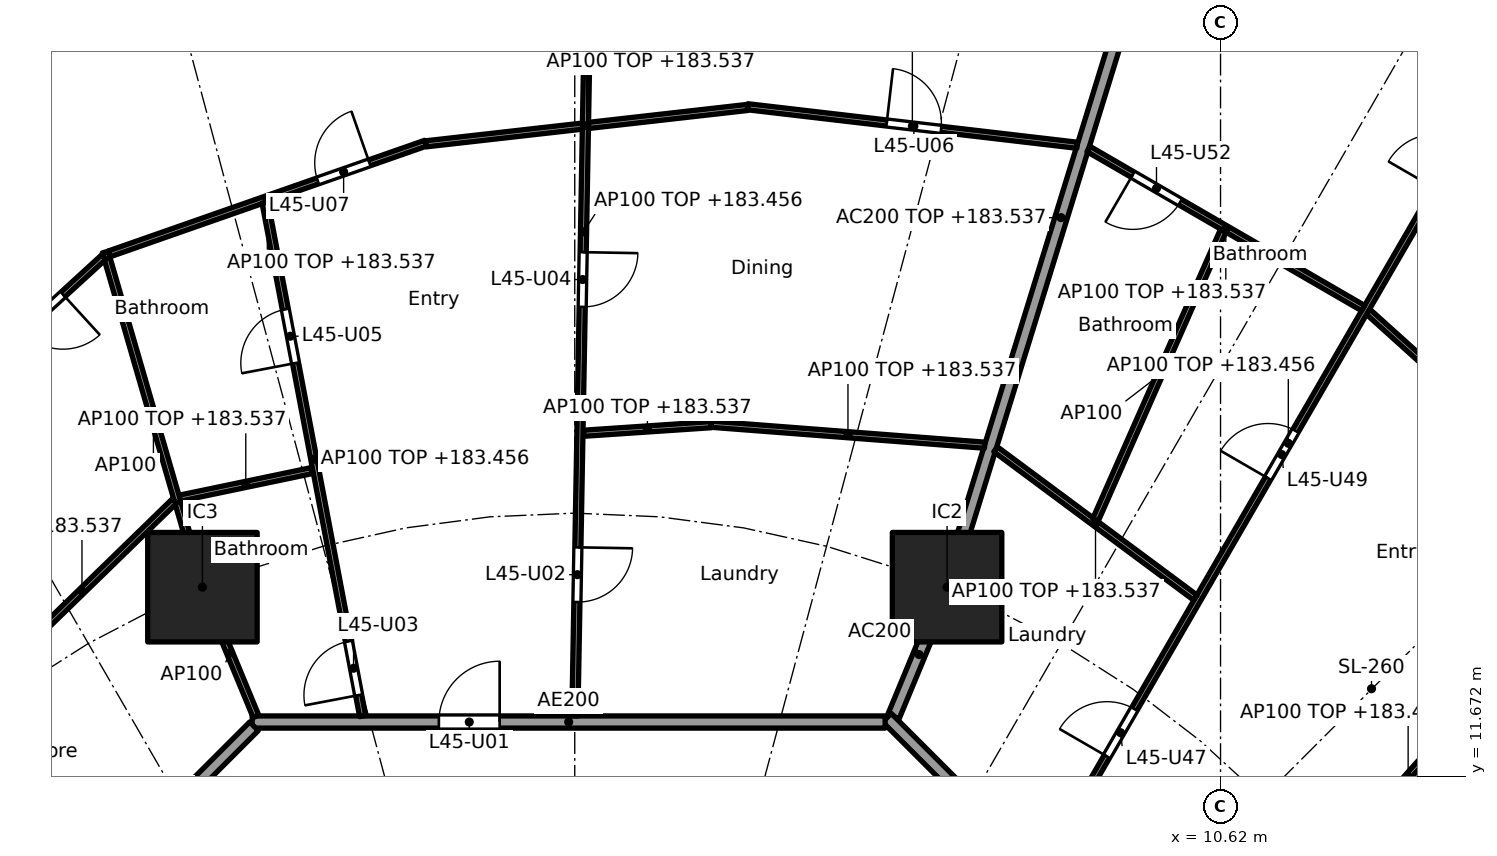
"""IFC4 building model, lengths in metres.
Left out: names, types, materials, properties, quantities, classifications, styles, units other than length and angle.
Written with IfcOpenShell. Run it as: python <this file> out.ifc"""

import sys

from ifc_helpers import new_model, si_unit, direction, frame, frame_2d, origin, origin_2d, place, context, subcontext, project, spatial, rectangle, extrude, element, fill, save


model = new_model("IFC4")
c1 = context("Model", 3, precision=1e-05, world=origin(), true_north=direction((0.0, 1.0)))
c2 = subcontext(c1, "Body", "Model", "MODEL_VIEW")
j1 = project(units=[si_unit("LENGTHUNIT", "METRE"), si_unit("PLANEANGLEUNIT", "RADIAN")], contexts=[c1])
p1 = place(None, origin())
s1 = spatial("IfcSite", under=j1, at=p1, CompositionType="ELEMENT")
p2 = place(p1, origin())
s2 = spatial("IfcBuilding", under=s1, at=p2, CompositionType="ELEMENT")
p3 = place(p2, frame((0.0, 0.0, 180.7)))
s3 = spatial("IfcBuildingStorey", under=s2, at=p3, CompositionType="ELEMENT", Elevation=180.7)
for number, where, z_axis, x_axis in (
    (1, (6.123, 14.782, 0.0), (0.0, 0.0, 1.0), (1.0, 0.0, 0.0)),
    (2, (-6.123, 14.782, 0.0), (0.0, 0.0, 1.0), (1.0, 0.0, 0.0)),
):
    element("IfcColumn", number, at=place(p3, frame(where, z_axis=z_axis, x_axis=x_axis)), inside=s3, PredefinedType="COLUMN", context=c2, shape_type="SweptSolid", body=[
        extrude(rectangle(XDim=1.8, YDim=1.8, at=origin_2d()), origin(), (0.0, 0.0, 1.0), 3.7),
    ])
p4 = place(p3, frame((5.243, 12.657, 0.0), z_axis=(0.0, 0.0, 1.0), x_axis=(0.382747093259, 0.923853160736, 0.0)))
e3 = element("IfcWall", 3, at=p4, inside=s3, PredefinedType="PARTITIONING", context=c2, shape_type="SweptSolid", body=[
    extrude(rectangle(XDim=2.2, YDim=0.2, at=frame_2d((1.1, 0.0))), origin(), (0.0, 0.0, 1.0), 3.44),
])
p5 = place(p3, frame((6.138, 14.83, 0.0), z_axis=(0.0, 0.0, 1.0), x_axis=(0.294818517221, 0.955553264818, 0.0)))
e4 = element("IfcWall", 4, at=p5, inside=s3, PredefinedType="PARTITIONING", context=c2, shape_type="SweptSolid", body=[
    extrude(rectangle(XDim=12.619, YDim=0.2, at=frame_2d((6.31, 0.0))), origin(), (0.0, 0.0, 1.0), 2.837),
])
p6 = place(p3, frame((12.635, 5.134, 0.0), z_axis=(0.0, 0.0, 1.0), x_axis=(-0.707106781187, 0.707106781187, 0.0)))
e5 = element("IfcWall", 5, at=p6, inside=s3, PredefinedType="PARTITIONING", context=c2, shape_type="SweptSolid", body=[
    extrude(rectangle(XDim=10.609, YDim=0.2, at=frame_2d((5.305, 0.0))), origin(), (0.0, 0.0, 1.0), 3.44),
])
p7 = place(p6, frame((4.804, 0.0, 0.0)))
e6 = element("IfcOpeningElement", 6, at=p7, cuts=e5, PredefinedType="OPENING", context=c2, shape_type="SweptSolid", body=[
    extrude(rectangle(XDim=1.0, YDim=2.1, at=frame_2d((0.5, 1.05))), frame((0.0, 0.11, 0.0), z_axis=(0.0, -1.0, 0.0), x_axis=(1.0, 0.0, 0.0)), (0.0, 0.0, 1.0), 0.22),
])
p8 = place(p3, frame((5.104, 12.565, 0.0), z_axis=(0.0, 0.0, 1.0), x_axis=(-1.0, 0.0, 0.0)))
e7 = element("IfcWall", 7, at=p8, inside=s3, PredefinedType="PARTITIONING", context=c2, shape_type="SweptSolid", body=[
    extrude(rectangle(XDim=10.409, YDim=0.2, at=frame_2d((5.205, 0.0))), origin(), (0.0, 0.0, 1.0), 3.44),
])
p9 = place(p8, frame((6.339, 0.0, 0.0)))
e8 = element("IfcOpeningElement", 8, at=p9, cuts=e7, PredefinedType="OPENING", context=c2, shape_type="SweptSolid", body=[
    extrude(rectangle(XDim=1.0, YDim=2.1, at=frame_2d((0.5, 1.05))), frame((0.0, 0.11, 0.0), z_axis=(0.0, -1.0, 0.0), x_axis=(1.0, 0.0, 0.0)), (0.0, 0.0, 1.0), 0.22),
])
p10 = place(p3, frame((-5.275, 12.494, 0.0), z_axis=(0.0, 0.0, 1.0), x_axis=(-0.707106781187, -0.707106781187, 0.0)))
e9 = element("IfcWall", 9, at=p10, inside=s3, PredefinedType="PARTITIONING", context=c2, shape_type="SweptSolid", body=[
    extrude(rectangle(XDim=10.209, YDim=0.2, at=frame_2d((5.104, 0.0))), origin(), (0.0, 0.0, 1.0), 3.44),
])
p11 = place(p3, frame((10.178, 7.732, 0.0), z_axis=(0.0, 0.0, 1.0), x_axis=(0.667280084362, 0.744806880348, 0.0)))
e10 = element("IfcWall", 10, at=p11, inside=s3, PredefinedType="PARTITIONING", context=c2, shape_type="SweptSolid", body=[
    extrude(rectangle(XDim=10.572, YDim=0.1, at=frame_2d((5.286, 0.0))), origin(), (0.0, 0.0, 1.0), 2.756),
])
p12 = place(p11, frame((2.07, 0.0, 0.0)))
e11 = element("IfcOpeningElement", 11, at=p12, cuts=e10, PredefinedType="OPENING", context=c2, shape_type="SweptSolid", body=[
    extrude(rectangle(XDim=0.9, YDim=2.1, at=frame_2d((0.45, 1.05))), frame((0.0, 0.06, 0.0), z_axis=(0.0, -1.0, 0.0), x_axis=(1.0, 0.0, 0.0)), (0.0, 0.0, 1.0), 0.12),
])
p13 = place(p11, frame((7.331, 0.0, 0.0)))
e12 = element("IfcOpeningElement", 12, at=p13, cuts=e10, PredefinedType="OPENING", context=c2, shape_type="SweptSolid", body=[
    extrude(rectangle(XDim=0.9, YDim=2.1, at=frame_2d((0.45, 1.05))), frame((0.0, 0.06, 0.0), z_axis=(0.0, -1.0, 0.0), x_axis=(1.0, 0.0, 0.0)), (0.0, 0.0, 1.0), 0.12),
])
p14 = place(p3, frame((17.162, 15.603, 0.0), z_axis=(0.0, 0.0, 1.0), x_axis=(-0.742790086539, 0.66952437397, 0.0)))
e13 = element("IfcWall", 13, at=p14, inside=s3, PredefinedType="PARTITIONING", context=c2, shape_type="SweptSolid", body=[
    extrude(rectangle(XDim=5.542, YDim=0.1, at=frame_2d((2.771, 0.0))), origin(), (0.0, 0.0, 1.0), 2.837),
])
p15 = place(p14, frame((2.321, 0.0, 0.0)))
e14 = element("IfcOpeningElement", 14, at=p15, cuts=e13, PredefinedType="OPENING", context=c2, shape_type="SweptSolid", body=[
    extrude(rectangle(XDim=0.9, YDim=2.1, at=frame_2d((0.45, 1.05))), frame((0.0, 0.06, 0.0), z_axis=(0.0, -1.0, 0.0), x_axis=(1.0, 0.0, 0.0)), (0.0, 0.0, 1.0), 0.12),
])
p16 = place(p3, frame((7.708, 10.198, 0.0), z_axis=(0.0, 0.0, 1.0), x_axis=(0.501305229744, 0.865270516446, 0.0)))
e15 = element("IfcWall", 15, at=p16, inside=s3, PredefinedType="PARTITIONING", context=c2, shape_type="SweptSolid", body=[
    extrude(rectangle(XDim=16.064, YDim=0.1, at=frame_2d((8.032, 0.0))), origin(), (0.0, 0.0, 1.0), 2.756),
])
p17 = place(p16, frame((2.082, 0.0, 0.0)))
e16 = element("IfcOpeningElement", 16, at=p17, cuts=e15, PredefinedType="OPENING", context=c2, shape_type="SweptSolid", body=[
    extrude(rectangle(XDim=0.9, YDim=2.1, at=frame_2d((0.45, 1.05))), frame((0.0, 0.06, 0.0), z_axis=(0.0, -1.0, 0.0), x_axis=(1.0, 0.0, 0.0)), (0.0, 0.0, 1.0), 0.12),
])
p18 = place(p16, frame((7.369, 0.0, 0.0)))
e17 = element("IfcOpeningElement", 17, at=p18, cuts=e15, PredefinedType="OPENING", context=c2, shape_type="SweptSolid", body=[
    extrude(rectangle(XDim=0.9, YDim=2.1, at=frame_2d((0.45, 1.05))), frame((0.0, 0.06, 0.0), z_axis=(0.0, -1.0, 0.0), x_axis=(1.0, 0.0, 0.0)), (0.0, 0.0, 1.0), 0.12),
])
p19 = place(p16, frame((12.869, 0.0, 0.0)))
e18 = element("IfcOpeningElement", 18, at=p19, cuts=e15, PredefinedType="OPENING", context=c2, shape_type="SweptSolid", body=[
    extrude(rectangle(XDim=0.9, YDim=2.1, at=frame_2d((0.45, 1.05))), frame((0.0, 0.06, 0.0), z_axis=(0.0, -1.0, 0.0), x_axis=(1.0, 0.0, 0.0)), (0.0, 0.0, 1.0), 0.12),
])
p20 = place(p3, frame((10.207, 14.61, 0.0), z_axis=(0.0, 0.0, 1.0), x_axis=(-0.802769141821, 0.596289950394, 0.0)))
e19 = element("IfcWall", 19, at=p20, inside=s3, PredefinedType="PARTITIONING", context=c2, shape_type="SweptSolid", body=[
    extrude(rectangle(XDim=4.092, YDim=0.1, at=frame_2d((2.046, 0.0))), origin(), (0.0, 0.0, 1.0), 2.837),
])
p21 = place(p3, frame((12.965, 19.371, 0.0), z_axis=(0.0, 0.0, 1.0), x_axis=(-0.865286427811, 0.501277765163, 0.0)))
e20 = element("IfcWall", 20, at=p21, inside=s3, PredefinedType="PARTITIONING", context=c2, shape_type="SweptSolid", body=[
    extrude(rectangle(XDim=5.22, YDim=0.1, at=frame_2d((2.61, 0.0))), origin(), (0.0, 0.0, 1.0), 2.837),
])
p22 = place(p21, frame((3.478, 0.0, 0.0)))
e21 = element("IfcOpeningElement", 21, at=p22, cuts=e20, PredefinedType="OPENING", context=c2, shape_type="SweptSolid", body=[
    extrude(rectangle(XDim=0.9, YDim=2.1, at=frame_2d((0.45, 1.05))), frame((0.0, 0.06, 0.0), z_axis=(0.0, -1.0, 0.0), x_axis=(1.0, 0.0, 0.0)), (0.0, 0.0, 1.0), 0.12),
])
p23 = place(p3, frame((8.564, 15.89, 0.0), z_axis=(0.0, 0.0, 1.0), x_axis=(0.404011266873, 0.914754008595, 0.0)))
e22 = element("IfcWall", 22, at=p23, inside=s3, PredefinedType="PARTITIONING", context=c2, shape_type="SweptSolid", body=[
    extrude(rectangle(XDim=5.199, YDim=0.1, at=frame_2d((2.6, 0.0))), origin(), (0.0, 0.0, 1.0), 3.44),
])
p24 = place(p3, frame((6.741, 17.117, 0.0), z_axis=(0.0, 0.0, 1.0), x_axis=(-0.997078320723, 0.076386008825, 0.0)))
e23 = element("IfcWall", 23, at=p24, inside=s3, PredefinedType="PARTITIONING", context=c2, shape_type="SweptSolid", body=[
    extrude(rectangle(XDim=4.51, YDim=0.1, at=frame_2d((2.255, 0.0))), origin(), (0.0, 0.0, 1.0), 2.837),
])
p25 = place(p3, frame((8.262, 22.05, 0.0), z_axis=(0.0, 0.0, 1.0), x_axis=(-0.993250089265, 0.115992500516, 0.0)))
e24 = element("IfcWall", 24, at=p25, inside=s3, PredefinedType="PARTITIONING", context=c2, shape_type="SweptSolid", body=[
    extrude(rectangle(XDim=5.458, YDim=0.1, at=frame_2d((2.729, 0.0))), origin(), (0.0, 0.0, 1.0), 2.837),
])
p26 = place(p25, frame((2.254, 0.0, 0.0)))
e25 = element("IfcOpeningElement", 25, at=p26, cuts=e24, PredefinedType="OPENING", context=c2, shape_type="SweptSolid", body=[
    extrude(rectangle(XDim=0.9, YDim=2.1, at=frame_2d((0.45, 1.05))), frame((0.0, 0.06, 0.0), z_axis=(0.0, -1.0, 0.0), x_axis=(1.0, 0.0, 0.0)), (0.0, 0.0, 1.0), 0.12),
])
p27 = place(p3, frame((2.244, 17.455, 0.0), z_axis=(0.0, 0.0, 1.0), x_axis=(-0.997756833447, -0.06694252243, 0.0)))
e26 = element("IfcWall", 26, at=p27, inside=s3, PredefinedType="PARTITIONING", context=c2, shape_type="SweptSolid", body=[
    extrude(rectangle(XDim=2.104, YDim=0.1, at=frame_2d((1.052, 0.0))), origin(), (0.0, 0.0, 1.0), 2.837),
])
p28 = place(p3, frame((2.842, 22.671, 0.0), z_axis=(0.0, 0.0, 1.0), x_axis=(-0.993660315081, -0.112424099879, 0.0)))
e27 = element("IfcWall", 27, at=p28, inside=s3, PredefinedType="PARTITIONING", context=c2, shape_type="SweptSolid", body=[
    extrude(rectangle(XDim=5.325, YDim=0.1, at=frame_2d((2.662, 0.0))), origin(), (0.0, 0.0, 1.0), 2.837),
])
p29 = place(p3, frame((0.002, 12.665, 0.0), z_axis=(0.0, 0.0, 1.0), x_axis=(0.01792079652, 0.999839409631, 0.0)))
e28 = element("IfcWall", 28, at=p29, inside=s3, PredefinedType="PARTITIONING", context=c2, shape_type="SweptSolid", body=[
    extrude(rectangle(XDim=15.926, YDim=0.1, at=frame_2d((7.963, 0.0))), origin(), (0.0, 0.0, 1.0), 2.756),
])
p30 = place(p29, frame((1.873, 0.0, 0.0)))
e29 = element("IfcOpeningElement", 29, at=p30, cuts=e28, PredefinedType="OPENING", context=c2, shape_type="SweptSolid", body=[
    extrude(rectangle(XDim=0.9, YDim=2.1, at=frame_2d((0.45, 1.05))), frame((0.0, 0.06, 0.0), z_axis=(0.0, -1.0, 0.0), x_axis=(1.0, 0.0, 0.0)), (0.0, 0.0, 1.0), 0.12),
])
p31 = place(p29, frame((6.728, 0.0, 0.0)))
e30 = element("IfcOpeningElement", 30, at=p31, cuts=e28, PredefinedType="OPENING", context=c2, shape_type="SweptSolid", body=[
    extrude(rectangle(XDim=0.9, YDim=2.1, at=frame_2d((0.45, 1.05))), frame((0.0, 0.06, 0.0), z_axis=(0.0, -1.0, 0.0), x_axis=(1.0, 0.0, 0.0)), (0.0, 0.0, 1.0), 0.12),
])
p32 = place(p3, frame((-2.452, 22.083, 0.0), z_axis=(0.0, 0.0, 1.0), x_axis=(-0.943916289103, -0.330184856051, 0.0)))
e31 = element("IfcWall", 31, at=p32, inside=s3, PredefinedType="PARTITIONING", context=c2, shape_type="SweptSolid", body=[
    extrude(rectangle(XDim=5.517, YDim=0.1, at=frame_2d((2.759, 0.0))), origin(), (0.0, 0.0, 1.0), 2.837),
])
p33 = place(p32, frame((0.979, 0.0, 0.0)))
e32 = element("IfcOpeningElement", 32, at=p33, cuts=e31, PredefinedType="OPENING", context=c2, shape_type="SweptSolid", body=[
    extrude(rectangle(XDim=0.9, YDim=2.1, at=frame_2d((0.45, 1.05))), frame((0.0, 0.06, 0.0), z_axis=(0.0, -1.0, 0.0), x_axis=(1.0, 0.0, 0.0)), (0.0, 0.0, 1.0), 0.12),
])
p34 = place(p3, frame((-3.488, 12.663, 0.0), z_axis=(0.0, 0.0, 1.0), x_axis=(-0.186783185485, 0.982401161247, 0.0)))
e33 = element("IfcWall", 33, at=p34, inside=s3, PredefinedType="PARTITIONING", context=c2, shape_type="SweptSolid", body=[
    extrude(rectangle(XDim=8.595, YDim=0.1, at=frame_2d((4.298, 0.0))), origin(), (0.0, 0.0, 1.0), 2.756),
])
p35 = place(p34, frame((0.35, 0.0, 0.0)))
e34 = element("IfcOpeningElement", 34, at=p35, cuts=e33, PredefinedType="OPENING", context=c2, shape_type="SweptSolid", body=[
    extrude(rectangle(XDim=0.9, YDim=2.1, at=frame_2d((0.45, 1.05))), frame((0.0, 0.06, 0.0), z_axis=(0.0, -1.0, 0.0), x_axis=(1.0, 0.0, 0.0)), (0.0, 0.0, 1.0), 0.12),
])
p36 = place(p34, frame((5.908, 0.0, 0.0)))
e35 = element("IfcOpeningElement", 35, at=p36, cuts=e33, PredefinedType="OPENING", context=c2, shape_type="SweptSolid", body=[
    extrude(rectangle(XDim=0.9, YDim=2.1, at=frame_2d((0.45, 1.05))), frame((0.0, 0.06, 0.0), z_axis=(0.0, -1.0, 0.0), x_axis=(1.0, 0.0, 0.0)), (0.0, 0.0, 1.0), 0.12),
])
p37 = place(p3, frame((-4.324, 16.699, 0.0), z_axis=(0.0, 0.0, 1.0), x_axis=(-0.978908011866, -0.204301503432, 0.0)))
e36 = element("IfcWall", 36, at=p37, inside=s3, PredefinedType="PARTITIONING", context=c2, shape_type="SweptSolid", body=[
    extrude(rectangle(XDim=2.218, YDim=0.1, at=frame_2d((1.109, 0.0))), origin(), (0.0, 0.0, 1.0), 2.837),
])
p38 = place(p3, frame((-5.243, 12.657, 0.0), z_axis=(0.0, 0.0, 1.0), x_axis=(-0.382719158442, 0.923864733477, 0.0)))
e37 = element("IfcWall", 37, at=p38, inside=s3, PredefinedType="PARTITIONING", context=c2, shape_type="SweptSolid", body=[
    extrude(rectangle(XDim=2.25, YDim=0.1, at=frame_2d((1.125, 0.0))), origin(), (0.0, 0.0, 1.0), 3.44),
])
p39 = place(p3, frame((-6.137, 14.83, 0.0), z_axis=(0.0, 0.0, 1.0), x_axis=(-0.278471793245, 0.960444407744, 0.0)))
e38 = element("IfcWall", 38, at=p39, inside=s3, PredefinedType="PARTITIONING", context=c2, shape_type="SweptSolid", body=[
    extrude(rectangle(XDim=5.688, YDim=0.1, at=frame_2d((2.844, 0.0))), origin(), (0.0, 0.0, 1.0), 3.44),
])
p40 = place(p3, frame((-6.58, 16.201, 0.0), z_axis=(0.0, 0.0, 1.0), x_axis=(-0.716946269374, -0.697128429223, 0.0)))
e39 = element("IfcWall", 39, at=p40, inside=s3, PredefinedType="PARTITIONING", context=c2, shape_type="SweptSolid", body=[
    extrude(rectangle(XDim=4.25, YDim=0.1, at=frame_2d((2.125, 0.0))), origin(), (0.0, 0.0, 1.0), 2.837),
])
p41 = place(p3, frame((-7.744, 20.212, 0.0), z_axis=(0.0, 0.0, 1.0), x_axis=(-0.738051761282, -0.674744097913, 0.0)))
e40 = element("IfcWall", 40, at=p41, inside=s3, PredefinedType="PARTITIONING", context=c2, shape_type="SweptSolid", body=[
    extrude(rectangle(XDim=5.449, YDim=0.1, at=frame_2d((2.725, 0.0))), origin(), (0.0, 0.0, 1.0), 2.837),
])
p42 = place(p41, frame((0.912, 0.0, 0.0)))
e41 = element("IfcOpeningElement", 41, at=p42, cuts=e40, PredefinedType="OPENING", context=c2, shape_type="SweptSolid", body=[
    extrude(rectangle(XDim=0.9, YDim=2.1, at=frame_2d((0.45, 1.05))), frame((0.0, 0.06, 0.0), z_axis=(0.0, -1.0, 0.0), x_axis=(1.0, 0.0, 0.0)), (0.0, 0.0, 1.0), 0.12),
])
p43 = place(p9, frame((1.0, 0.0, 0.0), x_axis=(-1.0, 0.0, 0.0)))
e42 = element("IfcDoor", 42, at=p43, inside=s3, OperationType="SINGLE_SWING_RIGHT", PredefinedType="DOOR", context=c2, shape_type="SweptSolid", body=[
    extrude(rectangle(XDim=1.0, YDim=2.1, at=frame_2d((0.5, 1.05))), frame((0.0, 0.025, 0.0), z_axis=(0.0, -1.0, 0.0), x_axis=(1.0, 0.0, 0.0)), (0.0, 0.0, 1.0), 0.05),
])
fill(e8, e42)
p44 = place(p30, frame((0.9, 0.0, 0.0), x_axis=(-1.0, 0.0, 0.0)))
e43 = element("IfcDoor", 43, at=p44, inside=s3, OperationType="SINGLE_SWING_LEFT", PredefinedType="DOOR", context=c2, shape_type="SweptSolid", body=[
    extrude(rectangle(XDim=0.9, YDim=2.1, at=frame_2d((0.45, 1.05))), frame((0.0, 0.025, 0.0), z_axis=(0.0, -1.0, 0.0), x_axis=(1.0, 0.0, 0.0)), (0.0, 0.0, 1.0), 0.05),
])
fill(e29, e43)
p45 = place(p35, origin())
e44 = element("IfcDoor", 44, at=p45, inside=s3, OperationType="SINGLE_SWING_LEFT", PredefinedType="DOOR", context=c2, shape_type="SweptSolid", body=[
    extrude(rectangle(XDim=0.9, YDim=2.1, at=frame_2d((0.45, 1.05))), frame((0.0, 0.025, 0.0), z_axis=(0.0, -1.0, 0.0), x_axis=(1.0, 0.0, 0.0)), (0.0, 0.0, 1.0), 0.05),
])
fill(e34, e44)
p46 = place(p31, frame((0.9, 0.0, 0.0), x_axis=(-1.0, 0.0, 0.0)))
e45 = element("IfcDoor", 45, at=p46, inside=s3, OperationType="SINGLE_SWING_LEFT", PredefinedType="DOOR", context=c2, shape_type="SweptSolid", body=[
    extrude(rectangle(XDim=0.9, YDim=2.1, at=frame_2d((0.45, 1.05))), frame((0.0, 0.025, 0.0), z_axis=(0.0, -1.0, 0.0), x_axis=(1.0, 0.0, 0.0)), (0.0, 0.0, 1.0), 0.05),
])
fill(e30, e45)
p47 = place(p36, origin())
e46 = element("IfcDoor", 46, at=p47, inside=s3, OperationType="SINGLE_SWING_LEFT", PredefinedType="DOOR", context=c2, shape_type="SweptSolid", body=[
    extrude(rectangle(XDim=0.9, YDim=2.1, at=frame_2d((0.45, 1.05))), frame((0.0, 0.025, 0.0), z_axis=(0.0, -1.0, 0.0), x_axis=(1.0, 0.0, 0.0)), (0.0, 0.0, 1.0), 0.05),
])
fill(e35, e46)
p48 = place(p26, frame((0.9, 0.0, 0.0), x_axis=(-1.0, 0.0, 0.0)))
e47 = element("IfcDoor", 47, at=p48, inside=s3, OperationType="SINGLE_SWING_LEFT", PredefinedType="DOOR", context=c2, shape_type="SweptSolid", body=[
    extrude(rectangle(XDim=0.9, YDim=2.1, at=frame_2d((0.45, 1.05))), frame((0.0, 0.025, 0.0), z_axis=(0.0, -1.0, 0.0), x_axis=(1.0, 0.0, 0.0)), (0.0, 0.0, 1.0), 0.05),
])
fill(e25, e47)
p49 = place(p33, frame((0.9, 0.0, 0.0), x_axis=(-1.0, 0.0, 0.0)))
e48 = element("IfcDoor", 48, at=p49, inside=s3, OperationType="SINGLE_SWING_RIGHT", PredefinedType="DOOR", context=c2, shape_type="SweptSolid", body=[
    extrude(rectangle(XDim=0.9, YDim=2.1, at=frame_2d((0.45, 1.05))), frame((0.0, 0.025, 0.0), z_axis=(0.0, -1.0, 0.0), x_axis=(1.0, 0.0, 0.0)), (0.0, 0.0, 1.0), 0.05),
])
fill(e32, e48)
p50 = place(p42, origin())
e49 = element("IfcDoor", 49, at=p50, inside=s3, OperationType="SINGLE_SWING_LEFT", PredefinedType="DOOR", context=c2, shape_type="SweptSolid", body=[
    extrude(rectangle(XDim=0.9, YDim=2.1, at=frame_2d((0.45, 1.05))), frame((0.0, 0.025, 0.0), z_axis=(0.0, -1.0, 0.0), x_axis=(1.0, 0.0, 0.0)), (0.0, 0.0, 1.0), 0.05),
])
fill(e41, e49)
p51 = place(p17, origin())
e50 = element("IfcDoor", 50, at=p51, inside=s3, OperationType="SINGLE_SWING_LEFT", PredefinedType="DOOR", context=c2, shape_type="SweptSolid", body=[
    extrude(rectangle(XDim=0.9, YDim=2.1, at=frame_2d((0.45, 1.05))), frame((0.0, 0.025, 0.0), z_axis=(0.0, -1.0, 0.0), x_axis=(1.0, 0.0, 0.0)), (0.0, 0.0, 1.0), 0.05),
])
fill(e16, e50)
p52 = place(p18, origin())
e51 = element("IfcDoor", 51, at=p52, inside=s3, OperationType="SINGLE_SWING_LEFT", PredefinedType="DOOR", context=c2, shape_type="SweptSolid", body=[
    extrude(rectangle(XDim=0.9, YDim=2.1, at=frame_2d((0.45, 1.05))), frame((0.0, 0.025, 0.0), z_axis=(0.0, -1.0, 0.0), x_axis=(1.0, 0.0, 0.0)), (0.0, 0.0, 1.0), 0.05),
])
fill(e17, e51)
p53 = place(p22, origin())
e52 = element("IfcDoor", 52, at=p53, inside=s3, OperationType="SINGLE_SWING_RIGHT", PredefinedType="DOOR", context=c2, shape_type="SweptSolid", body=[
    extrude(rectangle(XDim=0.9, YDim=2.1, at=frame_2d((0.45, 1.05))), frame((0.0, 0.025, 0.0), z_axis=(0.0, -1.0, 0.0), x_axis=(1.0, 0.0, 0.0)), (0.0, 0.0, 1.0), 0.05),
])
fill(e21, e52)
save(model, sys.argv[1])
